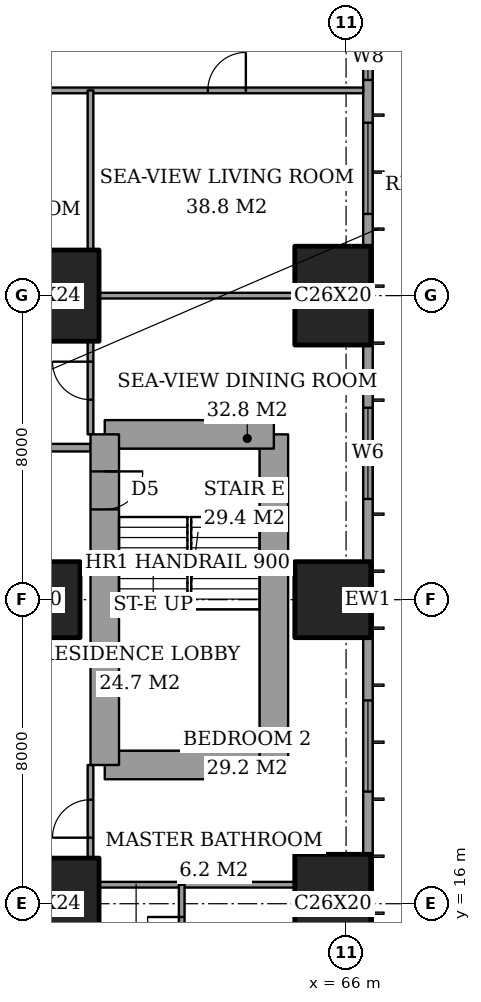
"""IFC4 building model, lengths in metres.
Left out: names, types, materials, properties, quantities, classifications, styles, units other than length and angle.
Written with IfcOpenShell. Run it as: python <this file> out.ifc"""

import sys

from ifc_helpers import new_model, si_unit, direction, frame, frame_2d, origin, origin_2d, place, context, subcontext, project, spatial, rectangle, extrude, element, fill, save


model = new_model("IFC4")
c1 = context("Model", 3, precision=1e-05, world=origin(), true_north=direction((0.0, 1.0)))
c2 = subcontext(c1, "Body", "Model", "MODEL_VIEW")
j1 = project(units=[si_unit("LENGTHUNIT", "METRE"), si_unit("PLANEANGLEUNIT", "RADIAN")], contexts=[c1])
p1 = place(None, origin())
s1 = spatial("IfcSite", under=j1, at=p1, CompositionType="ELEMENT")
p2 = place(p1, origin())
s2 = spatial("IfcBuilding", under=s1, at=p2, CompositionType="ELEMENT")
p3 = place(p2, frame((0.0, 0.0, 40.4)))
s3 = spatial("IfcBuildingStorey", under=s2, at=p3, CompositionType="ELEMENT", Elevation=40.4)
p4 = place(p3, frame((58.0, 16.0, 0.0), z_axis=(0.0, 0.0, 1.0), x_axis=(1.0, 0.0, 0.0)))
e1 = element("IfcColumn", 1, at=p4, inside=s3, PredefinedType="COLUMN", context=c2, shape_type="SweptSolid", body=[
    extrude(rectangle(XDim=3.0, YDim=2.4, at=origin_2d()), origin(), (0.0, 0.0, 1.0), 3.6),
])
p5 = place(p3, frame((58.0, 24.0, 0.0), z_axis=(0.0, 0.0, 1.0), x_axis=(1.0, 0.0, 0.0)))
e2 = element("IfcColumn", 2, at=p5, inside=s3, PredefinedType="COLUMN", context=c2, shape_type="SweptSolid", body=[
    extrude(rectangle(XDim=2.0, YDim=2.0, at=origin_2d()), origin(), (0.0, 0.0, 1.0), 3.6),
])
p6 = place(p3, frame((58.0, 32.0, 0.0), z_axis=(0.0, 0.0, 1.0), x_axis=(1.0, 0.0, 0.0)))
e3 = element("IfcColumn", 3, at=p6, inside=s3, PredefinedType="COLUMN", context=c2, shape_type="SweptSolid", body=[
    extrude(rectangle(XDim=3.0, YDim=2.4, at=origin_2d()), origin(), (0.0, 0.0, 1.0), 3.6),
])
p7 = place(p3, frame((65.65, 16.0, 0.0), z_axis=(0.0, 0.0, 1.0), x_axis=(0.0, 1.0, 0.0)))
e4 = element("IfcColumn", 4, at=p7, inside=s3, PredefinedType="COLUMN", context=c2, shape_type="SweptSolid", body=[
    extrude(rectangle(XDim=2.6, YDim=2.0, at=origin_2d()), origin(), (0.0, 0.0, 1.0), 3.6),
])
p8 = place(p3, frame((65.65, 24.0, 0.0), z_axis=(0.0, 0.0, 1.0), x_axis=(1.0, 0.0, 0.0)))
e5 = element("IfcColumn", 5, at=p8, inside=s3, PredefinedType="COLUMN", context=c2, shape_type="SweptSolid", body=[
    extrude(rectangle(XDim=2.0, YDim=2.0, at=origin_2d()), origin(), (0.0, 0.0, 1.0), 3.6),
])
p9 = place(p3, frame((65.65, 32.0, 0.0), z_axis=(0.0, 0.0, 1.0), x_axis=(0.0, 1.0, 0.0)))
e6 = element("IfcColumn", 6, at=p9, inside=s3, PredefinedType="COLUMN", context=c2, shape_type="SweptSolid", body=[
    extrude(rectangle(XDim=2.6, YDim=2.0, at=origin_2d()), origin(), (0.0, 0.0, 1.0), 3.6),
])
p10 = place(p3, frame((59.65, 19.65, 0.0), z_axis=(0.0, 0.0, 1.0), x_axis=(1.0, 0.0, 0.0)))
e7 = element("IfcWall", 7, at=p10, inside=s3, PredefinedType="SHEAR", context=c2, shape_type="SweptSolid", body=[
    extrude(rectangle(XDim=4.45, YDim=0.75, at=frame_2d((2.225, 0.0))), origin(), (0.0, 0.0, 1.0), 3.6),
])
p11 = place(p3, frame((64.1, 19.65, 0.0), z_axis=(0.0, 0.0, 1.0), x_axis=(0.0, 1.0, 0.0)))
e8 = element("IfcWall", 8, at=p11, inside=s3, PredefinedType="SHEAR", context=c2, shape_type="SweptSolid", body=[
    extrude(rectangle(XDim=8.7, YDim=0.75, at=frame_2d((4.35, 0.0))), origin(), (0.0, 0.0, 1.0), 3.6),
])
p12 = place(p3, frame((64.1, 28.35, 0.0), z_axis=(0.0, 0.0, 1.0), x_axis=(-1.0, 0.0, 0.0)))
e9 = element("IfcWall", 9, at=p12, inside=s3, PredefinedType="SHEAR", context=c2, shape_type="SweptSolid", body=[
    extrude(rectangle(XDim=4.45, YDim=0.75, at=frame_2d((2.225, 0.0))), origin(), (0.0, 0.0, 1.0), 3.6),
])
p13 = place(p3, frame((59.65, 28.35, 0.0), z_axis=(0.0, 0.0, 1.0), x_axis=(0.0, -1.0, 0.0)))
e10 = element("IfcWall", 10, at=p13, inside=s3, PredefinedType="SHEAR", context=c2, shape_type="SweptSolid", body=[
    extrude(rectangle(XDim=8.7, YDim=0.75, at=frame_2d((4.35, 0.0))), origin(), (0.0, 0.0, 1.0), 3.6),
])
p14 = place(p13, frame((0.975, 0.0, 0.0)))
e11 = element("IfcOpeningElement", 11, at=p14, cuts=e10, PredefinedType="OPENING", context=c2, shape_type="SweptSolid", body=[
    extrude(rectangle(XDim=1.0, YDim=2.1, at=frame_2d((0.5, 1.05))), frame((0.0, 0.385, 0.0), z_axis=(0.0, -1.0, 0.0), x_axis=(1.0, 0.0, 0.0)), (0.0, 0.0, 1.0), 0.77),
])
p15 = place(p3, frame((66.575, 3.175, 0.0), z_axis=(0.0, 0.0, 1.0), x_axis=(0.0, 1.0, 0.0)))
e12 = element("IfcWall", 12, at=p15, inside=s3, PredefinedType="SOLIDWALL", context=c2, shape_type="SweptSolid", body=[
    extrude(rectangle(XDim=41.65, YDim=0.25, at=frame_2d((20.825, 0.0))), origin(), (0.0, 0.0, 1.0), 3.6),
])
p16 = place(p15, frame((0.775, 0.0, 0.6)))
e13 = element("IfcOpeningElement", 13, at=p16, cuts=e12, PredefinedType="OPENING", context=c2, shape_type="SweptSolid", body=[
    extrude(rectangle(XDim=2.4, YDim=2.0, at=frame_2d((1.2, 1.0))), frame((0.0, 0.135, 0.0), z_axis=(0.0, -1.0, 0.0), x_axis=(1.0, 0.0, 0.0)), (0.0, 0.0, 1.0), 0.27),
])
p17 = place(p15, frame((6.1, 0.0, 0.6)))
e14 = element("IfcOpeningElement", 14, at=p17, cuts=e12, PredefinedType="OPENING", context=c2, shape_type="SweptSolid", body=[
    extrude(rectangle(XDim=1.2, YDim=2.0, at=frame_2d((0.6, 1.0))), frame((0.0, 0.135, 0.0), z_axis=(0.0, -1.0, 0.0), x_axis=(1.0, 0.0, 0.0)), (0.0, 0.0, 1.0), 0.27),
])
p18 = place(p15, frame((8.275, 0.0, 0.6)))
e15 = element("IfcOpeningElement", 15, at=p18, cuts=e12, PredefinedType="OPENING", context=c2, shape_type="SweptSolid", body=[
    extrude(rectangle(XDim=2.4, YDim=2.0, at=frame_2d((1.2, 1.0))), frame((0.0, 0.135, 0.0), z_axis=(0.0, -1.0, 0.0), x_axis=(1.0, 0.0, 0.0)), (0.0, 0.0, 1.0), 0.27),
])
p19 = place(p15, frame((15.775, 0.0, 0.6)))
e16 = element("IfcOpeningElement", 16, at=p19, cuts=e12, PredefinedType="OPENING", context=c2, shape_type="SweptSolid", body=[
    extrude(rectangle(XDim=2.4, YDim=2.0, at=frame_2d((1.2, 1.0))), frame((0.0, 0.135, 0.0), z_axis=(0.0, -1.0, 0.0), x_axis=(1.0, 0.0, 0.0)), (0.0, 0.0, 1.0), 0.27),
])
p20 = place(p15, frame((23.475, 0.0, 0.6)))
e17 = element("IfcOpeningElement", 17, at=p20, cuts=e12, PredefinedType="OPENING", context=c2, shape_type="SweptSolid", body=[
    extrude(rectangle(XDim=2.4, YDim=2.0, at=frame_2d((1.2, 1.0))), frame((0.0, 0.135, 0.0), z_axis=(0.0, -1.0, 0.0), x_axis=(1.0, 0.0, 0.0)), (0.0, 0.0, 1.0), 0.27),
])
p21 = place(p15, frame((30.975, 0.0, 0.6)))
e18 = element("IfcOpeningElement", 18, at=p21, cuts=e12, PredefinedType="OPENING", context=c2, shape_type="SweptSolid", body=[
    extrude(rectangle(XDim=2.4, YDim=2.0, at=frame_2d((1.2, 1.0))), frame((0.0, 0.135, 0.0), z_axis=(0.0, -1.0, 0.0), x_axis=(1.0, 0.0, 0.0)), (0.0, 0.0, 1.0), 0.27),
])
p22 = place(p15, frame((34.5, 0.0, 0.6)))
e19 = element("IfcOpeningElement", 19, at=p22, cuts=e12, PredefinedType="OPENING", context=c2, shape_type="SweptSolid", body=[
    extrude(rectangle(XDim=1.2, YDim=2.0, at=frame_2d((0.6, 1.0))), frame((0.0, 0.135, 0.0), z_axis=(0.0, -1.0, 0.0), x_axis=(1.0, 0.0, 0.0)), (0.0, 0.0, 1.0), 0.27),
])
p23 = place(p15, frame((38.475, 0.0, 0.6)))
e20 = element("IfcOpeningElement", 20, at=p23, cuts=e12, PredefinedType="OPENING", context=c2, shape_type="SweptSolid", body=[
    extrude(rectangle(XDim=2.4, YDim=2.0, at=frame_2d((1.2, 1.0))), frame((0.0, 0.135, 0.0), z_axis=(0.0, -1.0, 0.0), x_axis=(1.0, 0.0, 0.0)), (0.0, 0.0, 1.0), 0.27),
])
p24 = place(p3, frame((59.5, 16.5, 0.0), z_axis=(0.0, 0.0, 1.0), x_axis=(1.0, 0.0, 0.0)))
e21 = element("IfcWall", 21, at=p24, inside=s3, PredefinedType="PARTITIONING", context=c2, shape_type="SweptSolid", body=[
    extrude(rectangle(XDim=5.15, YDim=0.15, at=frame_2d((2.575, 0.0))), origin(), (0.0, 0.0, 1.0), 3.35),
])
p25 = place(p3, frame((42.0, 28.0, 0.0), z_axis=(0.0, 0.0, 1.0), x_axis=(1.0, 0.0, 0.0)))
e22 = element("IfcWall", 22, at=p25, inside=s3, PredefinedType="PARTITIONING", context=c2, shape_type="SweptSolid", body=[
    extrude(rectangle(XDim=17.275, YDim=0.2, at=frame_2d((8.637, 0.0))), origin(), (0.0, 0.0, 1.0), 3.35),
])
p26 = place(p25, frame((9.4, 0.0, 0.0)))
e23 = element("IfcOpeningElement", 23, at=p26, cuts=e22, PredefinedType="OPENING", context=c2, shape_type="SweptSolid", body=[
    extrude(rectangle(XDim=1.2, YDim=2.4, at=frame_2d((0.6, 1.2))), frame((0.0, 0.11, 0.0), z_axis=(0.0, -1.0, 0.0), x_axis=(1.0, 0.0, 0.0)), (0.0, 0.0, 1.0), 0.22),
])
p27 = place(p3, frame((59.5, 32.0, 0.0), z_axis=(0.0, 0.0, 1.0), x_axis=(1.0, 0.0, 0.0)))
e24 = element("IfcWall", 24, at=p27, inside=s3, PredefinedType="PARTITIONING", context=c2, shape_type="SweptSolid", body=[
    extrude(rectangle(XDim=5.15, YDim=0.15, at=frame_2d((2.575, 0.0))), origin(), (0.0, 0.0, 1.0), 2.634),
])
p28 = place(p3, frame((41.439, 37.4, 0.0), z_axis=(0.0, 0.0, 1.0), x_axis=(1.0, 0.0, 0.0)))
e25 = element("IfcWall", 25, at=p28, inside=s3, PredefinedType="PARTITIONING", context=c2, shape_type="SweptSolid", body=[
    extrude(rectangle(XDim=25.011, YDim=0.15, at=frame_2d((12.505, 0.0))), origin(), (0.0, 0.0, 1.0), 3.35),
])
p29 = place(p28, frame((10.761, 0.0, 0.0)))
e26 = element("IfcOpeningElement", 26, at=p29, cuts=e25, PredefinedType="OPENING", context=c2, shape_type="SweptSolid", body=[
    extrude(rectangle(XDim=1.0, YDim=2.1, at=frame_2d((0.5, 1.05))), frame((0.0, 0.085, 0.0), z_axis=(0.0, -1.0, 0.0), x_axis=(1.0, 0.0, 0.0)), (0.0, 0.0, 1.0), 0.17),
])
p30 = place(p28, frame((20.924, 0.0, 0.0)))
e27 = element("IfcOpeningElement", 27, at=p30, cuts=e25, PredefinedType="OPENING", context=c2, shape_type="SweptSolid", body=[
    extrude(rectangle(XDim=1.0, YDim=2.1, at=frame_2d((0.5, 1.05))), frame((0.0, 0.085, 0.0), z_axis=(0.0, -1.0, 0.0), x_axis=(1.0, 0.0, 0.0)), (0.0, 0.0, 1.0), 0.17),
])
p31 = place(p28, frame((15.749, 0.0, 0.0)))
e28 = element("IfcOpeningElement", 28, at=p31, cuts=e25, PredefinedType="OPENING", context=c2, shape_type="SweptSolid", body=[
    extrude(rectangle(XDim=0.9, YDim=2.1, at=frame_2d((0.45, 1.05))), frame((0.0, 0.085, 0.0), z_axis=(0.0, -1.0, 0.0), x_axis=(1.0, 0.0, 0.0)), (0.0, 0.0, 1.0), 0.17),
])
p32 = place(p28, frame((12.961, 0.0, 0.0)))
e29 = element("IfcOpeningElement", 29, at=p32, cuts=e25, PredefinedType="OPENING", context=c2, shape_type="SweptSolid", body=[
    extrude(rectangle(XDim=1.0, YDim=2.1, at=frame_2d((0.5, 1.05))), frame((0.0, 0.085, 0.0), z_axis=(0.0, -1.0, 0.0), x_axis=(1.0, 0.0, 0.0)), (0.0, 0.0, 1.0), 0.17),
])
p33 = place(p28, frame((7.861, 0.0, 0.0)))
e30 = element("IfcOpeningElement", 30, at=p33, cuts=e25, PredefinedType="OPENING", context=c2, shape_type="SweptSolid", body=[
    extrude(rectangle(XDim=1.0, YDim=2.1, at=frame_2d((0.5, 1.05))), frame((0.0, 0.085, 0.0), z_axis=(0.0, -1.0, 0.0), x_axis=(1.0, 0.0, 0.0)), (0.0, 0.0, 1.0), 0.17),
])
p34 = place(p28, frame((2.836, 0.0, 0.0)))
e31 = element("IfcOpeningElement", 31, at=p34, cuts=e25, PredefinedType="OPENING", context=c2, shape_type="SweptSolid", body=[
    extrude(rectangle(XDim=1.0, YDim=2.1, at=frame_2d((0.5, 1.05))), frame((0.0, 0.085, 0.0), z_axis=(0.0, -1.0, 0.0), x_axis=(1.0, 0.0, 0.0)), (0.0, 0.0, 1.0), 0.17),
])
p35 = place(p3, frame((59.275, 17.2, 0.0), z_axis=(0.0, 0.0, 1.0), x_axis=(0.0, 1.0, 0.0)))
e32 = element("IfcWall", 32, at=p35, inside=s3, PredefinedType="PARTITIONING", context=c2, shape_type="SweptSolid", body=[
    extrude(rectangle(XDim=2.45, YDim=0.15, at=frame_2d((1.225, 0.0))), origin(), (0.0, 0.0, 1.0), 3.35),
])
p36 = place(p35, frame((0.538, 0.0, 0.0)))
e33 = element("IfcOpeningElement", 33, at=p36, cuts=e32, PredefinedType="OPENING", context=c2, shape_type="SweptSolid", body=[
    extrude(rectangle(XDim=1.0, YDim=2.1, at=frame_2d((0.5, 1.05))), frame((0.0, 0.085, 0.0), z_axis=(0.0, -1.0, 0.0), x_axis=(1.0, 0.0, 0.0)), (0.0, 0.0, 1.0), 0.17),
])
p37 = place(p3, frame((59.275, 28.35, 0.0), z_axis=(0.0, 0.0, 1.0), x_axis=(0.0, 1.0, 0.0)))
e34 = element("IfcWall", 34, at=p37, inside=s3, PredefinedType="PARTITIONING", context=c2, shape_type="SweptSolid", body=[
    extrude(rectangle(XDim=2.45, YDim=0.15, at=frame_2d((1.225, 0.0))), origin(), (0.0, 0.0, 1.0), 3.35),
])
p38 = place(p37, frame((0.913, 0.0, 0.0)))
e35 = element("IfcOpeningElement", 35, at=p38, cuts=e34, PredefinedType="OPENING", context=c2, shape_type="SweptSolid", body=[
    extrude(rectangle(XDim=1.0, YDim=2.1, at=frame_2d((0.5, 1.05))), frame((0.0, 0.085, 0.0), z_axis=(0.0, -1.0, 0.0), x_axis=(1.0, 0.0, 0.0)), (0.0, 0.0, 1.0), 0.17),
])
p39 = place(p3, frame((59.275, 33.2, 0.0), z_axis=(0.0, 0.0, 1.0), x_axis=(0.0, 1.0, 0.0)))
e36 = element("IfcWall", 36, at=p39, inside=s3, PredefinedType="PARTITIONING", context=c2, shape_type="SweptSolid", body=[
    extrude(rectangle(XDim=4.2, YDim=0.15, at=frame_2d((2.1, 0.0))), origin(), (0.0, 0.0, 1.0), 3.35),
])
p40 = place(p3, frame((61.675, 13.9, 0.0), z_axis=(0.0, 0.0, 1.0), x_axis=(0.0, 1.0, 0.0)))
e37 = element("IfcWall", 37, at=p40, inside=s3, PredefinedType="PARTITIONING", context=c2, shape_type="SweptSolid", body=[
    extrude(rectangle(XDim=2.6, YDim=0.15, at=frame_2d((1.3, 0.0))), origin(), (0.0, 0.0, 1.0), 3.35),
])
p41 = place(p40, frame((0.85, 0.0, 0.0)))
e38 = element("IfcOpeningElement", 38, at=p41, cuts=e37, PredefinedType="OPENING", context=c2, shape_type="SweptSolid", body=[
    extrude(rectangle(XDim=0.9, YDim=2.1, at=frame_2d((0.45, 1.05))), frame((0.0, 0.085, 0.0), z_axis=(0.0, -1.0, 0.0), x_axis=(1.0, 0.0, 0.0)), (0.0, 0.0, 1.0), 0.17),
])
p42 = place(p19, origin())
e39 = element("IfcWindow", 39, at=p42, inside=s3, PartitioningType="SINGLE_PANEL", PredefinedType="WINDOW", context=c2, shape_type="SweptSolid", body=[
    extrude(rectangle(XDim=2.4, YDim=2.0, at=frame_2d((1.2, 1.0))), frame((0.0, 0.03, 0.0), z_axis=(0.0, -1.0, 0.0), x_axis=(1.0, 0.0, 0.0)), (0.0, 0.0, 1.0), 0.06),
])
fill(e16, e39)
p43 = place(p20, origin())
e40 = element("IfcWindow", 40, at=p43, inside=s3, PartitioningType="SINGLE_PANEL", PredefinedType="WINDOW", context=c2, shape_type="SweptSolid", body=[
    extrude(rectangle(XDim=2.4, YDim=2.0, at=frame_2d((1.2, 1.0))), frame((0.0, 0.03, 0.0), z_axis=(0.0, -1.0, 0.0), x_axis=(1.0, 0.0, 0.0)), (0.0, 0.0, 1.0), 0.06),
])
fill(e17, e40)
p44 = place(p21, origin())
e41 = element("IfcWindow", 41, at=p44, inside=s3, PartitioningType="SINGLE_PANEL", PredefinedType="WINDOW", context=c2, shape_type="SweptSolid", body=[
    extrude(rectangle(XDim=2.4, YDim=2.0, at=frame_2d((1.2, 1.0))), frame((0.0, 0.03, 0.0), z_axis=(0.0, -1.0, 0.0), x_axis=(1.0, 0.0, 0.0)), (0.0, 0.0, 1.0), 0.06),
])
fill(e18, e41)
p45 = place(p22, origin())
e42 = element("IfcWindow", 42, at=p45, inside=s3, PartitioningType="SINGLE_PANEL", PredefinedType="WINDOW", context=c2, shape_type="SweptSolid", body=[
    extrude(rectangle(XDim=1.2, YDim=2.0, at=frame_2d((0.6, 1.0))), frame((0.0, 0.03, 0.0), z_axis=(0.0, -1.0, 0.0), x_axis=(1.0, 0.0, 0.0)), (0.0, 0.0, 1.0), 0.06),
])
fill(e19, e42)
p46 = place(p41, origin())
e43 = element("IfcDoor", 43, at=p46, inside=s3, OperationType="SINGLE_SWING_LEFT", PredefinedType="DOOR", context=c2, shape_type="SweptSolid", body=[
    extrude(rectangle(XDim=0.9, YDim=2.1, at=frame_2d((0.45, 1.05))), frame((0.0, 0.025, 0.0), z_axis=(0.0, -1.0, 0.0), x_axis=(1.0, 0.0, 0.0)), (0.0, 0.0, 1.0), 0.05),
])
fill(e38, e43)
p47 = place(p36, origin())
e44 = element("IfcDoor", 44, at=p47, inside=s3, OperationType="SINGLE_SWING_RIGHT", PredefinedType="DOOR", context=c2, shape_type="SweptSolid", body=[
    extrude(rectangle(XDim=1.0, YDim=2.1, at=frame_2d((0.5, 1.05))), frame((0.0, 0.025, 0.0), z_axis=(0.0, -1.0, 0.0), x_axis=(1.0, 0.0, 0.0)), (0.0, 0.0, 1.0), 0.05),
])
fill(e33, e44)
p48 = place(p30, origin())
e45 = element("IfcDoor", 45, at=p48, inside=s3, OperationType="SINGLE_SWING_LEFT", PredefinedType="DOOR", context=c2, shape_type="SweptSolid", body=[
    extrude(rectangle(XDim=1.0, YDim=2.1, at=frame_2d((0.5, 1.05))), frame((0.0, 0.025, 0.0), z_axis=(0.0, -1.0, 0.0), x_axis=(1.0, 0.0, 0.0)), (0.0, 0.0, 1.0), 0.05),
])
fill(e27, e45)
p49 = place(p38, origin())
e46 = element("IfcDoor", 46, at=p49, inside=s3, OperationType="SINGLE_SWING_LEFT", PredefinedType="DOOR", context=c2, shape_type="SweptSolid", body=[
    extrude(rectangle(XDim=1.0, YDim=2.1, at=frame_2d((0.5, 1.05))), frame((0.0, 0.025, 0.0), z_axis=(0.0, -1.0, 0.0), x_axis=(1.0, 0.0, 0.0)), (0.0, 0.0, 1.0), 0.05),
])
fill(e35, e46)
p50 = place(p14, origin())
e47 = element("IfcDoor", 47, at=p50, inside=s3, OperationType="SINGLE_SWING_RIGHT", PredefinedType="DOOR", context=c2, shape_type="SweptSolid", body=[
    extrude(rectangle(XDim=1.0, YDim=2.1, at=frame_2d((0.5, 1.05))), frame((0.0, 0.025, 0.0), z_axis=(0.0, -1.0, 0.0), x_axis=(1.0, 0.0, 0.0)), (0.0, 0.0, 1.0), 0.05),
])
fill(e11, e47)
save(model, sys.argv[1])
